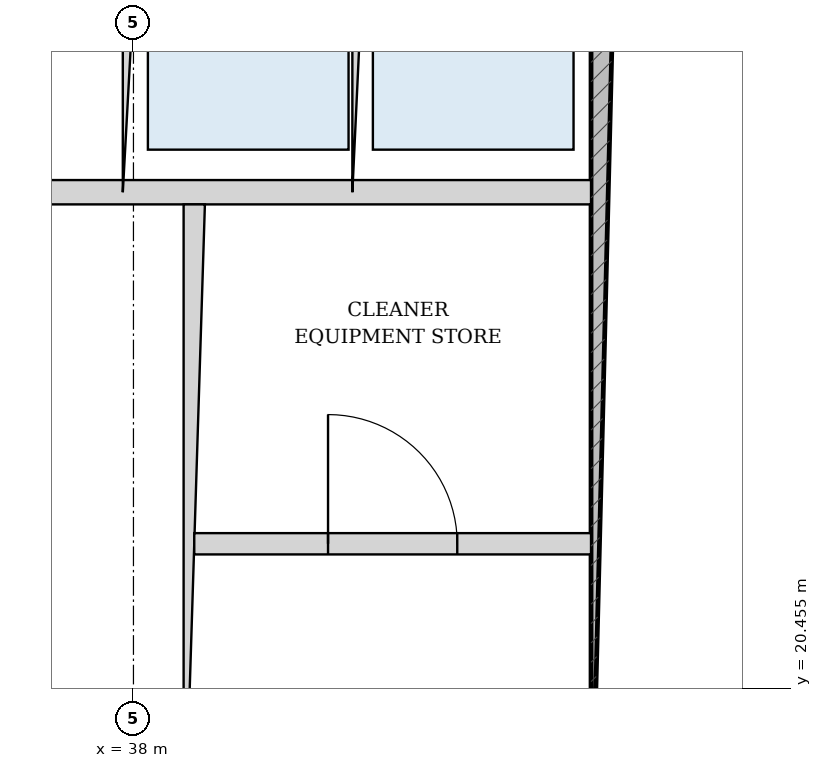
"""IFC4 building model, lengths in metres.
Left out: names, types, materials, properties, quantities, classifications, styles, units other than length and angle.
Written with IfcOpenShell. Run it as: python <this file> out.ifc"""

import sys

from ifc_helpers import new_model, si_unit, direction, frame, frame_2d, origin, place, context, subcontext, project, spatial, rectangle, extrude, source, transform, mapped, element, fill, save


model = new_model("IFC4")
c1 = context("Model", 3, precision=1e-05, world=origin(), true_north=direction((-0.2419218956, 0.970295726276)))
c2 = subcontext(c1, "Body", "Model", "MODEL_VIEW")
j1 = project(units=[si_unit("LENGTHUNIT", "METRE"), si_unit("PLANEANGLEUNIT", "RADIAN")], contexts=[c1])
p1 = place(None, origin())
s1 = spatial("IfcSite", under=j1, at=p1, CompositionType="ELEMENT")
p2 = place(p1, origin())
s2 = spatial("IfcBuilding", under=s1, at=p2, CompositionType="ELEMENT")
p3 = place(p2, frame((0.0, 0.0, 248.2)))
s3 = spatial("IfcBuildingStorey", under=s2, at=p3, CompositionType="ELEMENT", Elevation=248.2)
p4 = place(p3, frame((41.2, 19.175, 0.0), z_axis=(0.0, 0.0, 1.0), x_axis=(0.0, 1.0, 0.0)))
e1 = element("IfcWall", 1, at=p4, inside=s3, PredefinedType="SHEAR", context=c2, shape_type="SweptSolid", body=[
    extrude(rectangle(XDim=15.25, YDim=0.38, at=frame_2d((7.625, 0.0))), origin(), (0.0, 0.0, 1.0), 3.49),
])
p5 = place(p4, frame((7.8, 0.0, 0.0)))
e2 = element("IfcOpeningElement", 2, at=p5, cuts=e1, PredefinedType="OPENING", context=c2, shape_type="SweptSolid", body=[
    extrude(rectangle(XDim=1.05, YDim=2.15, at=frame_2d((0.525, 1.075))), frame((0.0, 0.2, 0.0), z_axis=(0.0, -1.0, 0.0), x_axis=(1.0, 0.0, 0.0)), (0.0, 0.0, 1.0), 0.4),
])
p6 = place(p3, frame((34.99, 23.72, 0.0), z_axis=(0.0, 0.0, 1.0), x_axis=(1.0, 0.0, 0.0)))
e3 = element("IfcWall", 3, at=p6, inside=s3, PredefinedType="PARTITIONING", context=c2, shape_type="SweptSolid", body=[
    extrude(rectangle(XDim=6.02, YDim=0.16, at=frame_2d((3.01, 0.0))), origin(), (0.0, 0.0, 1.0), 3.49),
])
p7 = place(p3, frame((38.0, 23.72, 0.0), z_axis=(0.0, 0.0, 1.0), x_axis=(0.0, 1.0, 0.0)))
e4 = element("IfcWall", 4, at=p7, inside=s3, PredefinedType="PARTITIONING", context=c2, shape_type="SweptSolid", body=[
    extrude(rectangle(XDim=2.56, YDim=0.14, at=frame_2d((1.28, 0.0))), origin(), (0.0, 0.0, 1.0), 3.49),
])
p8 = place(p3, frame((39.5, 23.72, 0.0), z_axis=(0.0, 0.0, 1.0), x_axis=(0.0, 1.0, 0.0)))
e5 = element("IfcWall", 5, at=p8, inside=s3, PredefinedType="PARTITIONING", context=c2, shape_type="SweptSolid", body=[
    extrude(rectangle(XDim=2.56, YDim=0.12, at=frame_2d((1.28, 0.0))), origin(), (0.0, 0.0, 1.0), 3.49),
])
p9 = place(p3, frame((38.4, 19.175, 0.0), z_axis=(0.0, 0.0, 1.0), x_axis=(0.0, 1.0, 0.0)))
e6 = element("IfcWall", 6, at=p9, inside=s3, PredefinedType="PARTITIONING", context=c2, shape_type="SweptSolid", body=[
    extrude(rectangle(XDim=4.465, YDim=0.14, at=frame_2d((2.232, 0.0))), origin(), (0.0, 0.0, 1.0), 3.49),
])
p10 = place(p3, frame((38.4, 21.407, 0.0), z_axis=(0.0, 0.0, 1.0), x_axis=(1.0, 0.0, 0.0)))
e7 = element("IfcWall", 7, at=p10, inside=s3, PredefinedType="PARTITIONING", context=c2, shape_type="SweptSolid", body=[
    extrude(rectangle(XDim=2.61, YDim=0.14, at=frame_2d((1.305, 0.0))), origin(), (0.0, 0.0, 1.0), 3.49),
])
p11 = place(p10, frame((0.88, 0.0, 0.0)))
e8 = element("IfcOpeningElement", 8, at=p11, cuts=e7, PredefinedType="OPENING", context=c2, shape_type="SweptSolid", body=[
    extrude(rectangle(XDim=0.85, YDim=2.1, at=frame_2d((0.425, 1.05))), frame((0.0, 0.08, 0.0), z_axis=(0.0, -1.0, 0.0), x_axis=(1.0, 0.0, 0.0)), (0.0, 0.0, 1.0), 0.16),
])
m1 = source(origin(), c2, "Body", "SweptSolid", [
    extrude(rectangle(XDim=0.85, YDim=2.1, at=frame_2d((0.425, 1.05))), frame((0.0, 0.025, 0.0), z_axis=(0.0, -1.0, 0.0), x_axis=(1.0, 0.0, 0.0)), (0.0, 0.0, 1.0), 0.05),
])
p12 = place(p11, origin())
e9 = element("IfcDoor", 9, at=p12, inside=s3, OperationType="SINGLE_SWING_LEFT", PredefinedType="DOOR", context=c2, shape_type="MappedRepresentation", body=[
    mapped(m1, transform((0.0, 0.0, 0.0), scale=1.0)),
])
fill(e8, e9)
save(model, sys.argv[1])
